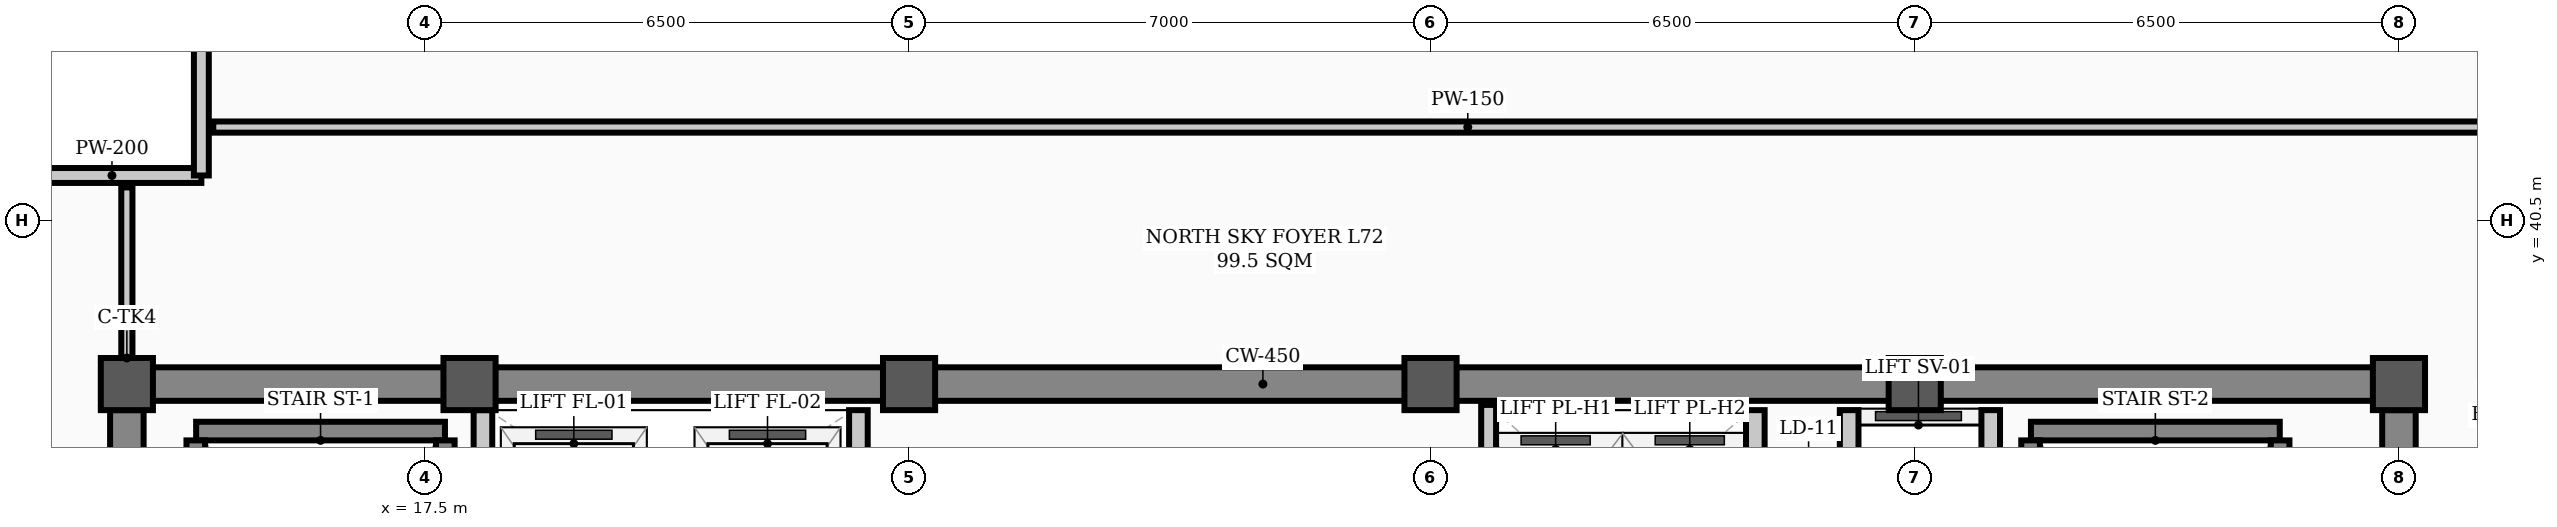
"""IFC4 building model, lengths in metres.
Left out: names, types, materials, properties, quantities, classifications, styles, units other than length and angle.
Written with IfcOpenShell. Run it as: python <this file> out.ifc"""

import sys

from ifc_helpers import new_model, si_unit, direction, frame, frame_2d, origin, origin_2d, place, context, subcontext, project, spatial, rectangle, hollow_rectangle, extrude, element, save


model = new_model("IFC4")
c1 = context("Model", 3, precision=1e-05, world=origin(), true_north=direction((0.0, 1.0)))
c2 = subcontext(c1, "Body", "Model", "MODEL_VIEW")
j1 = project(units=[si_unit("LENGTHUNIT", "METRE"), si_unit("PLANEANGLEUNIT", "RADIAN")], contexts=[c1])
p1 = place(None, origin())
s1 = spatial("IfcSite", under=j1, at=p1, CompositionType="ELEMENT")
p2 = place(p1, origin())
s2 = spatial("IfcBuilding", under=s1, at=p2, CompositionType="ELEMENT")
p3 = place(p2, frame((0.0, 0.0, 289.1)))
s3 = spatial("IfcBuildingStorey", under=s2, at=p3, CompositionType="ELEMENT", Elevation=289.1)
for number, where, z_axis, x_axis in (
    (1, (13.5, 38.3, 0.0), (0.0, 0.0, 1.0), (1.0, 0.0, 0.0)),
    (2, (18.1, 38.3, 0.0), (0.0, 0.0, 1.0), (1.0, 0.0, 0.0)),
    (3, (24.0, 38.3, 0.0), (0.0, 0.0, 1.0), (1.0, 0.0, 0.0)),
    (4, (31.0, 38.3, 0.0), (0.0, 0.0, 1.0), (1.0, 0.0, 0.0)),
    (5, (37.5, 38.3, 0.0), (0.0, 0.0, 1.0), (1.0, 0.0, 0.0)),
    (6, (44.0, 38.3, 0.0), (0.0, 0.0, 1.0), (1.0, 0.0, 0.0)),
):
    element("IfcColumn", number, at=place(p3, frame(where, z_axis=z_axis, x_axis=x_axis)), inside=s3, PredefinedType="COLUMN", context=c2, shape_type="SweptSolid", body=[
        extrude(hollow_rectangle(XDim=0.7, YDim=0.7, WallThickness=0.028, InnerFilletRadius=0.014, OuterFilletRadius=0.042, at=origin_2d()), origin(), (0.0, 0.0, 1.0), 3.9),
    ])
for number, where, z_axis, x_axis in (
    (7, (12.1, 41.1, 0.0), (0.0, 0.0, 1.0), (1.0, 0.0, 0.0)),
    (8, (14.5, 41.1, 0.0), (0.0, 0.0, 1.0), (0.0, 1.0, 0.0)),
):
    element("IfcWall", number, at=place(p3, frame(where, z_axis=z_axis, x_axis=x_axis)), inside=s3, PredefinedType="PARAPET", context=c2, shape_type="SweptSolid", body=[
        extrude(rectangle(XDim=2.4, YDim=0.2, at=frame_2d((1.2, 0.0))), origin(), (0.0, 0.0, 1.0), 1.2),
    ])
p4 = place(p3, frame((13.5, 38.3, 0.0), z_axis=(0.0, 0.0, 1.0), x_axis=(1.0, 0.0, 0.0)))
e9 = element("IfcWall", 9, at=p4, inside=s3, PredefinedType="SHEAR", context=c2, shape_type="SweptSolid", body=[
    extrude(rectangle(XDim=30.5, YDim=0.45, at=frame_2d((15.25, 0.0))), origin(), (0.0, 0.0, 1.0), 3.72),
])
for number, where, z_axis, x_axis in (
    (10, (13.5, 29.35, 0.0), (0.0, 0.0, 1.0), (0.0, 1.0, 0.0)),
    (11, (44.0, 29.35, 0.0), (0.0, 0.0, 1.0), (0.0, 1.0, 0.0)),
):
    element("IfcWall", number, at=place(p3, frame(where, z_axis=z_axis, x_axis=x_axis)), inside=s3, PredefinedType="SHEAR", context=c2, shape_type="SweptSolid", body=[
        extrude(rectangle(XDim=8.6, YDim=0.45, at=frame_2d((4.3, 0.0))), origin(), (0.0, 0.0, 1.0), 3.72),
    ])
p5 = place(p3, frame((14.43, 37.669, 0.0), z_axis=(0.0, 0.0, 1.0), x_axis=(1.0, 0.0, 0.0)))
e12 = element("IfcWall", 12, at=p5, inside=s3, PredefinedType="STANDARD", context=c2, shape_type="SweptSolid", body=[
    extrude(rectangle(XDim=3.34, YDim=0.25, at=frame_2d((1.67, 0.0))), origin(), (0.0, 0.0, 1.0), 3.72),
])
for number, where, z_axis, x_axis in (
    (13, (14.425, 30.36, 0.0), (0.0, 0.0, 1.0), (0.0, 1.0, 0.0)),
    (14, (17.775, 30.36, 0.0), (0.0, 0.0, 1.0), (0.0, 1.0, 0.0)),
):
    element("IfcWall", number, at=place(p3, frame(where, z_axis=z_axis, x_axis=x_axis)), inside=s3, PredefinedType="STANDARD", context=c2, shape_type="SweptSolid", body=[
        extrude(rectangle(XDim=7.184, YDim=0.25, at=frame_2d((3.592, 0.0))), origin(), (0.0, 0.0, 1.0), 3.72),
    ])
p6 = place(p3, frame((39.06, 37.669, 0.0), z_axis=(0.0, 0.0, 1.0), x_axis=(1.0, 0.0, 0.0)))
e15 = element("IfcWall", 15, at=p6, inside=s3, PredefinedType="STANDARD", context=c2, shape_type="SweptSolid", body=[
    extrude(rectangle(XDim=3.34, YDim=0.25, at=frame_2d((1.67, 0.0))), origin(), (0.0, 0.0, 1.0), 3.72),
])
for number, where, z_axis, x_axis in (
    (16, (39.055, 30.36, 0.0), (0.0, 0.0, 1.0), (0.0, 1.0, 0.0)),
    (17, (42.405, 30.36, 0.0), (0.0, 0.0, 1.0), (0.0, 1.0, 0.0)),
):
    element("IfcWall", number, at=place(p3, frame(where, z_axis=z_axis, x_axis=x_axis)), inside=s3, PredefinedType="STANDARD", context=c2, shape_type="SweptSolid", body=[
        extrude(rectangle(XDim=7.184, YDim=0.25, at=frame_2d((3.592, 0.0))), origin(), (0.0, 0.0, 1.0), 3.72),
    ])
p7 = place(p3, frame((36.62, 31.95, 0.0), z_axis=(0.0, 0.0, 1.0), x_axis=(0.0, 1.0, 0.0)))
e18 = element("IfcWall", 18, at=p7, inside=s3, PredefinedType="STANDARD", context=c2, shape_type="SweptSolid", body=[
    extrude(rectangle(XDim=6.0, YDim=0.25, at=frame_2d((3.0, 0.0))), origin(), (0.0, 0.0, 1.0), 3.4),
])
p8 = place(p7, frame((0.9, 0.0, 0.0)))
e19 = element("IfcOpeningElement", 19, at=p8, cuts=e18, PredefinedType="OPENING", context=c2, shape_type="SweptSolid", body=[
    extrude(rectangle(XDim=1.1, YDim=2.08, at=frame_2d((0.55, 1.04))), frame((0.0, 0.135, 0.0), z_axis=(0.0, -1.0, 0.0), x_axis=(1.0, 0.0, 0.0)), (0.0, 0.0, 1.0), 0.27),
])
p9 = place(p7, frame((4.0, 0.0, 0.0)))
e20 = element("IfcOpeningElement", 20, at=p9, cuts=e18, PredefinedType="OPENING", context=c2, shape_type="SweptSolid", body=[
    extrude(rectangle(XDim=1.1, YDim=2.08, at=frame_2d((0.55, 1.04))), frame((0.0, 0.135, 0.0), z_axis=(0.0, -1.0, 0.0), x_axis=(1.0, 0.0, 0.0)), (0.0, 0.0, 1.0), 0.27),
])
p10 = place(p3, frame((38.52, 31.95, 0.0), z_axis=(0.0, 0.0, 1.0), x_axis=(0.0, 1.0, 0.0)))
e21 = element("IfcWall", 21, at=p10, inside=s3, PredefinedType="STANDARD", context=c2, shape_type="SweptSolid", body=[
    extrude(rectangle(XDim=6.0, YDim=0.25, at=frame_2d((3.0, 0.0))), origin(), (0.0, 0.0, 1.0), 3.4),
])
for number, where, z_axis, x_axis in (
    (22, (18.28, 34.62, 0.0), (0.0, 0.0, 1.0), (0.0, 1.0, 0.0)),
    (23, (23.32, 34.62, 0.0), (0.0, 0.0, 1.0), (0.0, 1.0, 0.0)),
):
    element("IfcWall", number, at=place(p3, frame(where, z_axis=z_axis, x_axis=x_axis)), inside=s3, PredefinedType="STANDARD", context=c2, shape_type="SweptSolid", body=[
        extrude(rectangle(XDim=3.33, YDim=0.25, at=frame_2d((1.665, 0.0))), origin(), (0.0, 0.0, 1.0), 3.72),
    ])
p11 = place(p3, frame((35.36, 34.9, 0.0), z_axis=(0.0, 0.0, 1.0), x_axis=(0.0, 1.0, 0.0)))
e24 = element("IfcWall", 24, at=p11, inside=s3, PredefinedType="STANDARD", context=c2, shape_type="SweptSolid", body=[
    extrude(rectangle(XDim=3.05, YDim=0.25, at=frame_2d((1.525, 0.0))), origin(), (0.0, 0.0, 1.0), 3.4),
])
p12 = place(p3, frame((14.66, 41.75, 0.0), z_axis=(0.0, 0.0, 1.0), x_axis=(1.0, 0.0, 0.0)))
e25 = element("IfcWall", 25, at=p12, inside=s3, PredefinedType="PARTITIONING", context=c2, shape_type="SweptSolid", body=[
    extrude(rectangle(XDim=33.68, YDim=0.15, at=frame_2d((16.84, 0.0))), origin(), (0.0, 0.0, 1.0), 3.2),
])
p13 = place(p3, frame((13.5, 38.535, 0.0), z_axis=(0.0, 0.0, 1.0), x_axis=(0.0, 1.0, 0.0)))
e26 = element("IfcWall", 26, at=p13, inside=s3, PredefinedType="PARTITIONING", context=c2, shape_type="SweptSolid", body=[
    extrude(rectangle(XDim=2.405, YDim=0.15, at=frame_2d((1.203, 0.0))), origin(), (0.0, 0.0, 1.0), 3.72),
])
p14 = place(p3, frame((31.78, 34.9, 0.0), z_axis=(0.0, 0.0, 1.0), x_axis=(0.0, 1.0, 0.0)))
e27 = element("IfcWall", 27, at=p14, inside=s3, PredefinedType="STANDARD", context=c2, shape_type="SweptSolid", body=[
    extrude(rectangle(XDim=3.12, YDim=0.2, at=frame_2d((1.56, 0.0))), origin(), (0.0, 0.0, 1.0), 3.4),
])
save(model, sys.argv[1])
